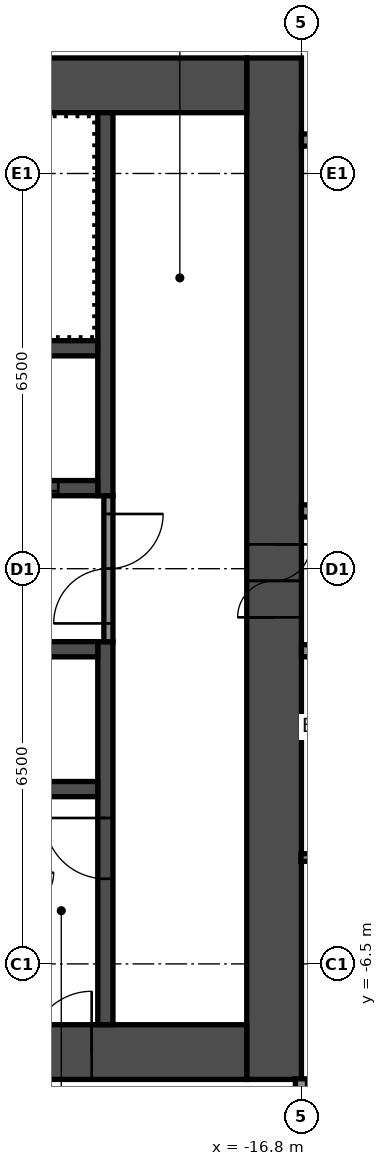
"""IFC4 building model, lengths in metres.
Left out: names, types, materials, properties, quantities, classifications, styles, units other than length and angle.
Written with IfcOpenShell. Run it as: python <this file> out.ifc"""

import sys

from ifc_helpers import new_model, si_unit, direction, frame, frame_2d, origin, place, context, subcontext, project, spatial, rectangle, extrude, element, fill, save


model = new_model("IFC4")
c1 = context("Model", 3, precision=1e-05, world=origin(), true_north=direction((0.0, 1.0)))
c2 = subcontext(c1, "Body", "Model", "MODEL_VIEW")
j1 = project(units=[si_unit("LENGTHUNIT", "METRE"), si_unit("PLANEANGLEUNIT", "RADIAN")], contexts=[c1])
p1 = place(None, origin())
s1 = spatial("IfcSite", under=j1, at=p1, CompositionType="ELEMENT")
p2 = place(p1, origin())
s2 = spatial("IfcBuilding", under=s1, at=p2, CompositionType="ELEMENT")
p3 = place(p2, frame((0.0, 0.0, 97.8)))
s3 = spatial("IfcBuildingStorey", under=s2, at=p3, CompositionType="ELEMENT", Elevation=97.8)
p4 = place(p3, frame((-17.25, -8.4, 0.0), z_axis=(0.0, 0.0, 1.0), x_axis=(0.0, 1.0, 0.0)))
e1 = element("IfcWall", 1, at=p4, inside=s3, PredefinedType="SHEAR", context=c2, shape_type="SweptSolid", body=[
    extrude(rectangle(XDim=16.8, YDim=0.9, at=frame_2d((8.4, 0.0))), origin(), (0.0, 0.0, 1.0), 2.8),
])
p5 = place(p4, frame((7.6, 0.0, 0.0)))
e2 = element("IfcOpeningElement", 2, at=p5, cuts=e1, PredefinedType="OPENING", context=c2, shape_type="SweptSolid", body=[
    extrude(rectangle(XDim=1.2, YDim=2.1, at=frame_2d((0.6, 1.05))), frame((0.0, 0.46, 0.0), z_axis=(0.0, -1.0, 0.0), x_axis=(1.0, 0.0, 0.0)), (0.0, 0.0, 1.0), 0.92),
])
p6 = place(p3, frame((-32.7, 7.95, 0.0), z_axis=(0.0, 0.0, 1.0), x_axis=(1.0, 0.0, 0.0)))
e3 = element("IfcWall", 3, at=p6, inside=s3, PredefinedType="SHEAR", context=c2, shape_type="SweptSolid", body=[
    extrude(rectangle(XDim=15.0, YDim=0.9, at=frame_2d((7.5, 0.0))), origin(), (0.0, 0.0, 1.0), 2.8),
])
p7 = place(p6, frame((3.4, 0.0, 0.0)))
e4 = element("IfcOpeningElement", 4, at=p7, cuts=e3, PredefinedType="OPENING", context=c2, shape_type="SweptSolid", body=[
    extrude(rectangle(XDim=1.2, YDim=2.1, at=frame_2d((0.6, 1.05))), frame((0.0, 0.46, 0.0), z_axis=(0.0, -1.0, 0.0), x_axis=(1.0, 0.0, 0.0)), (0.0, 0.0, 1.0), 0.92),
])
p8 = place(p6, frame((0.75, 0.0, 0.0)))
e5 = element("IfcOpeningElement", 5, at=p8, cuts=e3, PredefinedType="OPENING", context=c2, shape_type="SweptSolid", body=[
    extrude(rectangle(XDim=0.9, YDim=2.1, at=frame_2d((0.45, 1.05))), frame((0.0, 0.46, 0.0), z_axis=(0.0, -1.0, 0.0), x_axis=(1.0, 0.0, 0.0)), (0.0, 0.0, 1.0), 0.92),
])
p9 = place(p3, frame((-32.7, -7.95, 0.0), z_axis=(0.0, 0.0, 1.0), x_axis=(1.0, 0.0, 0.0)))
e6 = element("IfcWall", 6, at=p9, inside=s3, PredefinedType="SHEAR", context=c2, shape_type="SweptSolid", body=[
    extrude(rectangle(XDim=15.0, YDim=0.9, at=frame_2d((7.5, 0.0))), origin(), (0.0, 0.0, 1.0), 2.8),
])
p10 = place(p9, frame((11.45, 0.0, 0.0)))
e7 = element("IfcOpeningElement", 7, at=p10, cuts=e6, PredefinedType="OPENING", context=c2, shape_type="SweptSolid", body=[
    extrude(rectangle(XDim=1.0, YDim=2.1, at=frame_2d((0.5, 1.05))), frame((0.0, 0.46, 0.0), z_axis=(0.0, -1.0, 0.0), x_axis=(1.0, 0.0, 0.0)), (0.0, 0.0, 1.0), 0.92),
])
p11 = place(p3, frame((-20.025, 1.2, 0.0), z_axis=(0.0, 0.0, 1.0), x_axis=(0.0, 1.0, 0.0)))
e8 = element("IfcWall", 8, at=p11, inside=s3, PredefinedType="SHEAR", context=c2, shape_type="SweptSolid", body=[
    extrude(rectangle(XDim=6.3, YDim=0.25, at=frame_2d((3.15, 0.0))), origin(), (0.0, 0.0, 1.0), 2.8),
])
p12 = place(p3, frame((-20.025, -7.5, 0.0), z_axis=(0.0, 0.0, 1.0), x_axis=(0.0, 1.0, 0.0)))
e9 = element("IfcWall", 9, at=p12, inside=s3, PredefinedType="SHEAR", context=c2, shape_type="SweptSolid", body=[
    extrude(rectangle(XDim=6.3, YDim=0.25, at=frame_2d((3.15, 0.0))), origin(), (0.0, 0.0, 1.0), 2.8),
])
p13 = place(p12, frame((2.4, 0.0, 0.0)))
e10 = element("IfcOpeningElement", 10, at=p13, cuts=e9, PredefinedType="OPENING", context=c2, shape_type="SweptSolid", body=[
    extrude(rectangle(XDim=1.0, YDim=2.1, at=frame_2d((0.5, 1.05))), frame((0.0, 0.135, 0.0), z_axis=(0.0, -1.0, 0.0), x_axis=(1.0, 0.0, 0.0)), (0.0, 0.0, 1.0), 0.27),
])
p14 = place(p3, frame((-27.65, 1.325, 0.0), z_axis=(0.0, 0.0, 1.0), x_axis=(1.0, 0.0, 0.0)))
e11 = element("IfcWall", 11, at=p14, inside=s3, PredefinedType="SHEAR", context=c2, shape_type="SweptSolid", body=[
    extrude(rectangle(XDim=7.5, YDim=0.25, at=frame_2d((3.75, 0.0))), origin(), (0.0, 0.0, 1.0), 2.8),
])
p15 = place(p14, frame((5.75, 0.0, 0.0)))
e12 = element("IfcOpeningElement", 12, at=p15, cuts=e11, PredefinedType="OPENING", context=c2, shape_type="SweptSolid", body=[
    extrude(rectangle(XDim=1.1, YDim=2.1, at=frame_2d((0.55, 1.05))), frame((0.0, 0.135, 0.0), z_axis=(0.0, -1.0, 0.0), x_axis=(1.0, 0.0, 0.0)), (0.0, 0.0, 1.0), 0.27),
])
p16 = place(p14, frame((3.35, 0.0, 0.0)))
e13 = element("IfcOpeningElement", 13, at=p16, cuts=e11, PredefinedType="OPENING", context=c2, shape_type="SweptSolid", body=[
    extrude(rectangle(XDim=1.1, YDim=2.1, at=frame_2d((0.55, 1.05))), frame((0.0, 0.135, 0.0), z_axis=(0.0, -1.0, 0.0), x_axis=(1.0, 0.0, 0.0)), (0.0, 0.0, 1.0), 0.27),
])
p17 = place(p14, frame((0.95, 0.0, 0.0)))
e14 = element("IfcOpeningElement", 14, at=p17, cuts=e11, PredefinedType="OPENING", context=c2, shape_type="SweptSolid", body=[
    extrude(rectangle(XDim=1.1, YDim=2.1, at=frame_2d((0.55, 1.05))), frame((0.0, 0.135, 0.0), z_axis=(0.0, -1.0, 0.0), x_axis=(1.0, 0.0, 0.0)), (0.0, 0.0, 1.0), 0.27),
])
for number, where, z_axis, x_axis in (
    (15, (-27.65, 3.625, 0.0), (0.0, 0.0, 1.0), (1.0, 0.0, 0.0)),
    (16, (-27.65, -1.325, 0.0), (0.0, 0.0, 1.0), (1.0, 0.0, 0.0)),
    (17, (-27.65, -3.625, 0.0), (0.0, 0.0, 1.0), (1.0, 0.0, 0.0)),
):
    element("IfcWall", number, at=place(p3, frame(where, z_axis=z_axis, x_axis=x_axis)), inside=s3, PredefinedType="SHEAR", context=c2, shape_type="SweptSolid", body=[
        extrude(rectangle(XDim=7.5, YDim=0.25, at=frame_2d((3.75, 0.0))), origin(), (0.0, 0.0, 1.0), 2.8),
    ])
p18 = place(p3, frame((-19.975, -1.2, 0.0), z_axis=(0.0, 0.0, 1.0), x_axis=(0.0, 1.0, 0.0)))
e18 = element("IfcWall", 18, at=p18, inside=s3, PredefinedType="PARTITIONING", context=c2, shape_type="SweptSolid", body=[
    extrude(rectangle(XDim=2.4, YDim=0.15, at=frame_2d((1.2, 0.0))), origin(), (0.0, 0.0, 1.0), 2.8),
])
p19 = place(p18, frame((0.3, 0.0, 0.0)))
e19 = element("IfcOpeningElement", 19, at=p19, cuts=e18, PredefinedType="OPENING", context=c2, shape_type="SweptSolid", body=[
    extrude(rectangle(XDim=1.8, YDim=2.1, at=frame_2d((0.9, 1.05))), frame((0.0, 0.085, 0.0), z_axis=(0.0, -1.0, 0.0), x_axis=(1.0, 0.0, 0.0)), (0.0, 0.0, 1.0), 0.17),
])
p20 = place(p3, frame((-16.81, -4.75, 0.0), z_axis=(0.0, 0.0, 1.0), x_axis=(1.0, 0.0, 0.0)))
e20 = element("IfcWall", 20, at=p20, inside=s3, PredefinedType="PARTITIONING", context=c2, shape_type="SweptSolid", body=[
    extrude(rectangle(XDim=3.348, YDim=0.125, at=frame_2d((1.674, 0.0))), origin(), (0.0, 0.0, 1.0), 2.8),
])
p21 = place(p20, frame((1.31, 0.0, 0.0)))
e21 = element("IfcOpeningElement", 21, at=p21, cuts=e20, PredefinedType="OPENING", context=c2, shape_type="SweptSolid", body=[
    extrude(rectangle(XDim=0.8, YDim=2.1, at=frame_2d((0.4, 1.05))), frame((0.0, 0.073, 0.0), z_axis=(0.0, -1.0, 0.0), x_axis=(1.0, 0.0, 0.0)), (0.0, 0.0, 1.0), 0.145),
])
p22 = place(p3, frame((-16.8, -1.35, 0.0), z_axis=(0.0, 0.0, 1.0), x_axis=(1.0, 0.0, 0.0)))
e22 = element("IfcWall", 22, at=p22, inside=s3, PredefinedType="PARTITIONING", context=c2, shape_type="SweptSolid", body=[
    extrude(rectangle(XDim=33.6, YDim=0.2, at=frame_2d((16.8, 0.0))), origin(), (0.0, 0.0, 1.0), 2.8),
])
p23 = place(p22, frame((5.4, 0.0, 0.0)))
e23 = element("IfcOpeningElement", 23, at=p23, cuts=e22, PredefinedType="OPENING", context=c2, shape_type="SweptSolid", body=[
    extrude(rectangle(XDim=1.0, YDim=2.1, at=frame_2d((0.5, 1.05))), frame((0.0, 0.11, 0.0), z_axis=(0.0, -1.0, 0.0), x_axis=(1.0, 0.0, 0.0)), (0.0, 0.0, 1.0), 0.22),
])
p24 = place(p22, frame((11.25, 0.0, 0.0)))
e24 = element("IfcOpeningElement", 24, at=p24, cuts=e22, PredefinedType="OPENING", context=c2, shape_type="SweptSolid", body=[
    extrude(rectangle(XDim=1.0, YDim=2.1, at=frame_2d((0.5, 1.05))), frame((0.0, 0.11, 0.0), z_axis=(0.0, -1.0, 0.0), x_axis=(1.0, 0.0, 0.0)), (0.0, 0.0, 1.0), 0.22),
])
p25 = place(p22, frame((12.95, 0.0, 0.0)))
e25 = element("IfcOpeningElement", 25, at=p25, cuts=e22, PredefinedType="OPENING", context=c2, shape_type="SweptSolid", body=[
    extrude(rectangle(XDim=1.0, YDim=2.1, at=frame_2d((0.5, 1.05))), frame((0.0, 0.11, 0.0), z_axis=(0.0, -1.0, 0.0), x_axis=(1.0, 0.0, 0.0)), (0.0, 0.0, 1.0), 0.22),
])
p26 = place(p22, frame((17.86, 0.0, 0.0)))
e26 = element("IfcOpeningElement", 26, at=p26, cuts=e22, PredefinedType="OPENING", context=c2, shape_type="SweptSolid", body=[
    extrude(rectangle(XDim=0.9, YDim=2.1, at=frame_2d((0.45, 1.05))), frame((0.0, 0.11, 0.0), z_axis=(0.0, -1.0, 0.0), x_axis=(1.0, 0.0, 0.0)), (0.0, 0.0, 1.0), 0.22),
])
p27 = place(p22, frame((22.06, 0.0, 0.0)))
e27 = element("IfcOpeningElement", 27, at=p27, cuts=e22, PredefinedType="OPENING", context=c2, shape_type="SweptSolid", body=[
    extrude(rectangle(XDim=0.9, YDim=2.1, at=frame_2d((0.45, 1.05))), frame((0.0, 0.11, 0.0), z_axis=(0.0, -1.0, 0.0), x_axis=(1.0, 0.0, 0.0)), (0.0, 0.0, 1.0), 0.22),
])
p28 = place(p22, frame((28.05, 0.0, 0.0)))
e28 = element("IfcOpeningElement", 28, at=p28, cuts=e22, PredefinedType="OPENING", context=c2, shape_type="SweptSolid", body=[
    extrude(rectangle(XDim=1.0, YDim=2.1, at=frame_2d((0.5, 1.05))), frame((0.0, 0.11, 0.0), z_axis=(0.0, -1.0, 0.0), x_axis=(1.0, 0.0, 0.0)), (0.0, 0.0, 1.0), 0.22),
])
p29 = place(p22, frame((29.75, 0.0, 0.0)))
e29 = element("IfcOpeningElement", 29, at=p29, cuts=e22, PredefinedType="OPENING", context=c2, shape_type="SweptSolid", body=[
    extrude(rectangle(XDim=1.0, YDim=2.1, at=frame_2d((0.5, 1.05))), frame((0.0, 0.11, 0.0), z_axis=(0.0, -1.0, 0.0), x_axis=(1.0, 0.0, 0.0)), (0.0, 0.0, 1.0), 0.22),
])
p30 = place(p3, frame((-16.8, 0.95, 0.0), z_axis=(0.0, 0.0, 1.0), x_axis=(1.0, 0.0, 0.0)))
e30 = element("IfcWall", 30, at=p30, inside=s3, PredefinedType="PARTITIONING", context=c2, shape_type="SweptSolid", body=[
    extrude(rectangle(XDim=33.6, YDim=0.2, at=frame_2d((16.8, 0.0))), origin(), (0.0, 0.0, 1.0), 2.8),
])
p31 = place(p30, frame((9.88, 0.0, 0.0)))
e31 = element("IfcOpeningElement", 31, at=p31, cuts=e30, PredefinedType="OPENING", context=c2, shape_type="SweptSolid", body=[
    extrude(rectangle(XDim=0.9, YDim=2.1, at=frame_2d((0.45, 1.05))), frame((0.0, 0.11, 0.0), z_axis=(0.0, -1.0, 0.0), x_axis=(1.0, 0.0, 0.0)), (0.0, 0.0, 1.0), 0.22),
])
p32 = place(p30, frame((14.08, 0.0, 0.0)))
e32 = element("IfcOpeningElement", 32, at=p32, cuts=e30, PredefinedType="OPENING", context=c2, shape_type="SweptSolid", body=[
    extrude(rectangle(XDim=0.9, YDim=2.1, at=frame_2d((0.45, 1.05))), frame((0.0, 0.11, 0.0), z_axis=(0.0, -1.0, 0.0), x_axis=(1.0, 0.0, 0.0)), (0.0, 0.0, 1.0), 0.22),
])
p33 = place(p30, frame((27.185, 0.0, 0.0)))
e33 = element("IfcOpeningElement", 33, at=p33, cuts=e30, PredefinedType="OPENING", context=c2, shape_type="SweptSolid", body=[
    extrude(rectangle(XDim=0.9, YDim=2.1, at=frame_2d((0.45, 1.05))), frame((0.0, 0.11, 0.0), z_axis=(0.0, -1.0, 0.0), x_axis=(1.0, 0.0, 0.0)), (0.0, 0.0, 1.0), 0.22),
])
p34 = place(p30, frame((31.385, 0.0, 0.0)))
e34 = element("IfcOpeningElement", 34, at=p34, cuts=e30, PredefinedType="OPENING", context=c2, shape_type="SweptSolid", body=[
    extrude(rectangle(XDim=0.9, YDim=2.1, at=frame_2d((0.45, 1.05))), frame((0.0, 0.11, 0.0), z_axis=(0.0, -1.0, 0.0), x_axis=(1.0, 0.0, 0.0)), (0.0, 0.0, 1.0), 0.22),
])
p35 = place(p3, frame((-16.8, 7.05, 0.0), z_axis=(0.0, 0.0, 1.0), x_axis=(1.0, 0.0, 0.0)))
e35 = element("IfcWall", 35, at=p35, inside=s3, PredefinedType="PARTITIONING", context=c2, shape_type="SweptSolid", body=[
    extrude(rectangle(XDim=33.6, YDim=0.2, at=frame_2d((16.8, 0.0))), origin(), (0.0, 0.0, 1.0), 2.8),
])
p36 = place(p35, frame((2.07, 0.0, 0.0)))
e36 = element("IfcOpeningElement", 36, at=p36, cuts=e35, PredefinedType="OPENING", context=c2, shape_type="SweptSolid", body=[
    extrude(rectangle(XDim=0.9, YDim=2.1, at=frame_2d((0.45, 1.05))), frame((0.0, 0.11, 0.0), z_axis=(0.0, -1.0, 0.0), x_axis=(1.0, 0.0, 0.0)), (0.0, 0.0, 1.0), 0.22),
])
p37 = place(p35, frame((6.27, 0.0, 0.0)))
e37 = element("IfcOpeningElement", 37, at=p37, cuts=e35, PredefinedType="OPENING", context=c2, shape_type="SweptSolid", body=[
    extrude(rectangle(XDim=0.9, YDim=2.1, at=frame_2d((0.45, 1.05))), frame((0.0, 0.11, 0.0), z_axis=(0.0, -1.0, 0.0), x_axis=(1.0, 0.0, 0.0)), (0.0, 0.0, 1.0), 0.22),
])
p38 = place(p35, frame((19.04, 0.0, 0.0)))
e38 = element("IfcOpeningElement", 38, at=p38, cuts=e35, PredefinedType="OPENING", context=c2, shape_type="SweptSolid", body=[
    extrude(rectangle(XDim=0.9, YDim=2.1, at=frame_2d((0.45, 1.05))), frame((0.0, 0.11, 0.0), z_axis=(0.0, -1.0, 0.0), x_axis=(1.0, 0.0, 0.0)), (0.0, 0.0, 1.0), 0.22),
])
p39 = place(p35, frame((23.24, 0.0, 0.0)))
e39 = element("IfcOpeningElement", 39, at=p39, cuts=e35, PredefinedType="OPENING", context=c2, shape_type="SweptSolid", body=[
    extrude(rectangle(XDim=0.9, YDim=2.1, at=frame_2d((0.45, 1.05))), frame((0.0, 0.11, 0.0), z_axis=(0.0, -1.0, 0.0), x_axis=(1.0, 0.0, 0.0)), (0.0, 0.0, 1.0), 0.22),
])
p40 = place(p3, frame((-16.8, -15.55, 0.0), z_axis=(0.0, 0.0, 1.0), x_axis=(0.0, 1.0, 0.0)))
e40 = element("IfcWall", 40, at=p40, inside=s3, PredefinedType="PARTITIONING", context=c2, shape_type="SweptSolid", body=[
    extrude(rectangle(XDim=7.16, YDim=0.2, at=frame_2d((3.58, 0.0))), origin(), (0.0, 0.0, 1.0), 2.8),
])
p41 = place(p5, origin())
e41 = element("IfcDoor", 41, at=p41, inside=s3, OperationType="DOUBLE_DOOR_SINGLE_SWING", PredefinedType="DOOR", context=c2, shape_type="SweptSolid", body=[
    extrude(rectangle(XDim=1.2, YDim=2.1, at=frame_2d((0.6, 1.05))), frame((0.0, 0.025, 0.0), z_axis=(0.0, -1.0, 0.0), x_axis=(1.0, 0.0, 0.0)), (0.0, 0.0, 1.0), 0.05),
])
fill(e2, e41)
p42 = place(p10, origin())
e42 = element("IfcDoor", 42, at=p42, inside=s3, OperationType="SINGLE_SWING_LEFT", PredefinedType="DOOR", context=c2, shape_type="SweptSolid", body=[
    extrude(rectangle(XDim=1.0, YDim=2.1, at=frame_2d((0.5, 1.05))), frame((0.0, 0.025, 0.0), z_axis=(0.0, -1.0, 0.0), x_axis=(1.0, 0.0, 0.0)), (0.0, 0.0, 1.0), 0.05),
])
fill(e7, e42)
p43 = place(p13, origin())
e43 = element("IfcDoor", 43, at=p43, inside=s3, OperationType="SINGLE_SWING_LEFT", PredefinedType="DOOR", context=c2, shape_type="SweptSolid", body=[
    extrude(rectangle(XDim=1.0, YDim=2.1, at=frame_2d((0.5, 1.05))), frame((0.0, 0.025, 0.0), z_axis=(0.0, -1.0, 0.0), x_axis=(1.0, 0.0, 0.0)), (0.0, 0.0, 1.0), 0.05),
])
fill(e10, e43)
p44 = place(p19, origin())
e44 = element("IfcDoor", 44, at=p44, inside=s3, OperationType="DOUBLE_DOOR_SINGLE_SWING", PredefinedType="DOOR", context=c2, shape_type="SweptSolid", body=[
    extrude(rectangle(XDim=1.8, YDim=2.1, at=frame_2d((0.9, 1.05))), frame((0.0, 0.025, 0.0), z_axis=(0.0, -1.0, 0.0), x_axis=(1.0, 0.0, 0.0)), (0.0, 0.0, 1.0), 0.05),
])
fill(e19, e44)
p45 = place(p15, origin())
e45 = element("IfcDoor", 45, at=p45, inside=s3, OperationType="DOUBLE_DOOR_SLIDING", PredefinedType="DOOR", context=c2, shape_type="SweptSolid", body=[
    extrude(rectangle(XDim=1.1, YDim=2.1, at=frame_2d((0.55, 1.05))), frame((0.0, 0.025, 0.0), z_axis=(0.0, -1.0, 0.0), x_axis=(1.0, 0.0, 0.0)), (0.0, 0.0, 1.0), 0.05),
])
fill(e12, e45)
save(model, sys.argv[1])
